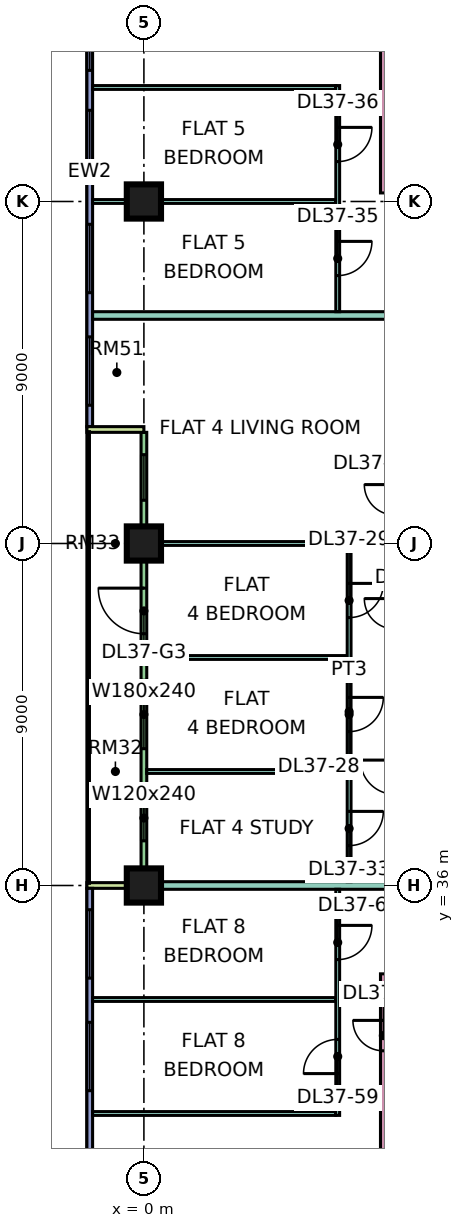
"""IFC4 building model, lengths in metres.
Left out: names, types, materials, properties, quantities, classifications, styles, units other than length and angle.
Written with IfcOpenShell. Run it as: python <this file> out.ifc"""

import sys

from ifc_helpers import new_model, si_unit, direction, frame, frame_2d, origin, origin_2d, place, context, subcontext, project, spatial, rectangle, extrude, element, fill, save


model = new_model("IFC4")
c1 = context("Model", 3, precision=1e-05, world=origin(), true_north=direction((0.0, 1.0)))
c2 = subcontext(c1, "Body", "Model", "MODEL_VIEW")
j1 = project(units=[si_unit("LENGTHUNIT", "METRE"), si_unit("PLANEANGLEUNIT", "RADIAN")], contexts=[c1])
p1 = place(None, origin())
s1 = spatial("IfcSite", under=j1, at=p1, CompositionType="ELEMENT")
p2 = place(p1, origin())
s2 = spatial("IfcBuilding", under=s1, at=p2, CompositionType="ELEMENT")
p3 = place(p2, frame((0.0, 0.0, 164.9)))
s3 = spatial("IfcBuildingStorey", under=s2, at=p3, CompositionType="ELEMENT", Elevation=164.9)
p4 = place(p3, frame((0.0, 36.0, 0.0), z_axis=(0.0, 0.0, 1.0), x_axis=(1.0, 0.0, 0.0)))
e1 = element("IfcColumn", 1, at=p4, inside=s3, PredefinedType="COLUMN", context=c2, shape_type="SweptSolid", body=[
    extrude(rectangle(XDim=0.9, YDim=0.9, at=origin_2d()), origin(), (0.0, 0.0, 1.0), 3.75),
])
for number, where, z_axis, x_axis in (
    (2, (0.0, 45.0, 0.0), (0.0, 0.0, 1.0), (1.0, 0.0, 0.0)),
    (3, (0.0, 54.0, 0.0), (0.0, 0.0, 1.0), (1.0, 0.0, 0.0)),
):
    element("IfcColumn", number, at=place(p3, frame(where, z_axis=z_axis, x_axis=x_axis)), inside=s3, PredefinedType="COLUMN", context=c2, shape_type="SweptSolid", body=[
        extrude(rectangle(XDim=0.9, YDim=0.9, at=origin_2d()), origin(), (0.0, 0.0, 1.0), 3.75),
    ])
p5 = place(p3, frame((-1.425, 61.5, 0.0), z_axis=(0.0, 0.0, 1.0), x_axis=(0.0, -1.0, 0.0)))
e4 = element("IfcWall", 4, at=p5, inside=s3, PredefinedType="SOLIDWALL", context=c2, shape_type="SweptSolid", body=[
    extrude(rectangle(XDim=13.425, YDim=0.15, at=frame_2d((6.712, 0.0))), origin(), (0.0, 0.0, 1.0), 3.35),
])
p6 = place(p5, frame((0.45, 0.0, 0.45)))
e5 = element("IfcOpeningElement", 5, at=p6, cuts=e4, PredefinedType="OPENING", context=c2, shape_type="SweptSolid", body=[
    extrude(rectangle(XDim=3.6, YDim=2.4, at=frame_2d((1.8, 1.2))), frame((0.0, 0.085, 0.0), z_axis=(0.0, -1.0, 0.0), x_axis=(1.0, 0.0, 0.0)), (0.0, 0.0, 1.0), 0.17),
])
p7 = place(p5, frame((5.1, 0.0, 0.45)))
e6 = element("IfcOpeningElement", 6, at=p7, cuts=e4, PredefinedType="OPENING", context=c2, shape_type="SweptSolid", body=[
    extrude(rectangle(XDim=1.8, YDim=2.4, at=frame_2d((0.9, 1.2))), frame((0.0, 0.085, 0.0), z_axis=(0.0, -1.0, 0.0), x_axis=(1.0, 0.0, 0.0)), (0.0, 0.0, 1.0), 0.17),
])
p8 = place(p5, frame((8.1, 0.0, 0.45)))
e7 = element("IfcOpeningElement", 7, at=p8, cuts=e4, PredefinedType="OPENING", context=c2, shape_type="SweptSolid", body=[
    extrude(rectangle(XDim=1.8, YDim=2.4, at=frame_2d((0.9, 1.2))), frame((0.0, 0.085, 0.0), z_axis=(0.0, -1.0, 0.0), x_axis=(1.0, 0.0, 0.0)), (0.0, 0.0, 1.0), 0.17),
])
p9 = place(p5, frame((11.062, 0.0, 0.45)))
e8 = element("IfcOpeningElement", 8, at=p9, cuts=e4, PredefinedType="OPENING", context=c2, shape_type="SweptSolid", body=[
    extrude(rectangle(XDim=1.8, YDim=2.4, at=frame_2d((0.9, 1.2))), frame((0.0, 0.085, 0.0), z_axis=(0.0, -1.0, 0.0), x_axis=(1.0, 0.0, 0.0)), (0.0, 0.0, 1.0), 0.17),
])
p10 = place(p3, frame((0.0, 47.925, 0.0), z_axis=(0.0, 0.0, 1.0), x_axis=(0.0, -1.0, 0.0)))
e9 = element("IfcWall", 9, at=p10, inside=s3, PredefinedType="SOLIDWALL", context=c2, shape_type="SweptSolid", body=[
    extrude(rectangle(XDim=11.85, YDim=0.15, at=frame_2d((5.925, 0.0))), origin(), (0.0, 0.0, 1.0), 3.35),
])
p11 = place(p10, frame((0.587, 0.0, 0.45)))
e10 = element("IfcOpeningElement", 10, at=p11, cuts=e9, PredefinedType="OPENING", context=c2, shape_type="SweptSolid", body=[
    extrude(rectangle(XDim=1.2, YDim=2.4, at=frame_2d((0.6, 1.2))), frame((0.0, 0.085, 0.0), z_axis=(0.0, -1.0, 0.0), x_axis=(1.0, 0.0, 0.0)), (0.0, 0.0, 1.0), 0.17),
])
p12 = place(p10, frame((4.1, 0.0, 0.0)))
e11 = element("IfcOpeningElement", 11, at=p12, cuts=e9, PredefinedType="OPENING", context=c2, shape_type="SweptSolid", body=[
    extrude(rectangle(XDim=1.2, YDim=2.4, at=frame_2d((0.6, 1.2))), frame((0.0, 0.085, 0.0), z_axis=(0.0, -1.0, 0.0), x_axis=(1.0, 0.0, 0.0)), (0.0, 0.0, 1.0), 0.17),
])
p13 = place(p10, frame((6.525, 0.0, 0.45)))
e12 = element("IfcOpeningElement", 12, at=p13, cuts=e9, PredefinedType="OPENING", context=c2, shape_type="SweptSolid", body=[
    extrude(rectangle(XDim=1.8, YDim=2.4, at=frame_2d((0.9, 1.2))), frame((0.0, 0.085, 0.0), z_axis=(0.0, -1.0, 0.0), x_axis=(1.0, 0.0, 0.0)), (0.0, 0.0, 1.0), 0.17),
])
p14 = place(p10, frame((9.55, 0.0, 0.45)))
e13 = element("IfcOpeningElement", 13, at=p14, cuts=e9, PredefinedType="OPENING", context=c2, shape_type="SweptSolid", body=[
    extrude(rectangle(XDim=1.2, YDim=2.4, at=frame_2d((0.6, 1.2))), frame((0.0, 0.085, 0.0), z_axis=(0.0, -1.0, 0.0), x_axis=(1.0, 0.0, 0.0)), (0.0, 0.0, 1.0), 0.17),
])
for number, where, z_axis, x_axis in (
    (14, (-1.5, 48.0, 0.0), (0.0, 0.0, 1.0), (1.0, 0.0, 0.0)),
    (15, (-1.5, 36.0, 0.0), (0.0, 0.0, 1.0), (1.0, 0.0, 0.0)),
):
    element("IfcWall", number, at=place(p3, frame(where, z_axis=z_axis, x_axis=x_axis)), inside=s3, PredefinedType="SOLIDWALL", context=c2, shape_type="SweptSolid", body=[
        extrude(rectangle(XDim=1.5, YDim=0.15, at=frame_2d((0.75, 0.0))), origin(), (0.0, 0.0, 1.0), 3.35),
    ])
p15 = place(p3, frame((-1.425, 35.925, 0.0), z_axis=(0.0, 0.0, 1.0), x_axis=(0.0, -1.0, 0.0)))
e16 = element("IfcWall", 16, at=p15, inside=s3, PredefinedType="SOLIDWALL", context=c2, shape_type="SweptSolid", body=[
    extrude(rectangle(XDim=11.85, YDim=0.15, at=frame_2d((5.925, 0.0))), origin(), (0.0, 0.0, 1.0), 3.35),
])
p16 = place(p15, frame((0.562, 0.0, 0.45)))
e17 = element("IfcOpeningElement", 17, at=p16, cuts=e16, PredefinedType="OPENING", context=c2, shape_type="SweptSolid", body=[
    extrude(rectangle(XDim=1.8, YDim=2.4, at=frame_2d((0.9, 1.2))), frame((0.0, 0.085, 0.0), z_axis=(0.0, -1.0, 0.0), x_axis=(1.0, 0.0, 0.0)), (0.0, 0.0, 1.0), 0.17),
])
p17 = place(p15, frame((3.525, 0.0, 0.45)))
e18 = element("IfcOpeningElement", 18, at=p17, cuts=e16, PredefinedType="OPENING", context=c2, shape_type="SweptSolid", body=[
    extrude(rectangle(XDim=1.8, YDim=2.4, at=frame_2d((0.9, 1.2))), frame((0.0, 0.085, 0.0), z_axis=(0.0, -1.0, 0.0), x_axis=(1.0, 0.0, 0.0)), (0.0, 0.0, 1.0), 0.17),
])
p18 = place(p15, frame((7.387, 0.0, 0.45)))
e19 = element("IfcOpeningElement", 19, at=p18, cuts=e16, PredefinedType="OPENING", context=c2, shape_type="SweptSolid", body=[
    extrude(rectangle(XDim=3.0, YDim=2.4, at=frame_2d((1.5, 1.2))), frame((0.0, 0.085, 0.0), z_axis=(0.0, -1.0, 0.0), x_axis=(1.0, 0.0, 0.0)), (0.0, 0.0, 1.0), 0.17),
])
for number, where, z_axis, x_axis in (
    (20, (-1.351, 33.0, 0.0), (0.0, 0.0, 1.0), (1.0, 0.0, 0.0)),
    (21, (-1.351, 54.0, 0.0), (0.0, 0.0, 1.0), (1.0, 0.0, 0.0)),
):
    element("IfcWall", number, at=place(p3, frame(where, z_axis=z_axis, x_axis=x_axis)), inside=s3, PredefinedType="PARTITIONING", context=c2, shape_type="SweptSolid", body=[
        extrude(rectangle(XDim=6.401, YDim=0.1, at=frame_2d((3.201, 0.0))), origin(), (0.0, 0.0, 1.0), 3.35),
    ])
p19 = place(p3, frame((-1.35, 30.0, 0.0), z_axis=(0.0, 0.0, 1.0), x_axis=(1.0, 0.0, 0.0)))
e22 = element("IfcWall", 22, at=p19, inside=s3, PredefinedType="PARTITIONING", context=c2, shape_type="SweptSolid", body=[
    extrude(rectangle(XDim=6.4, YDim=0.1, at=frame_2d((3.2, 0.0))), origin(), (0.0, 0.0, 1.0), 3.35),
])
e23 = element("IfcWall", 23, at=p4, inside=s3, PredefinedType="PARTITIONING", context=c2, shape_type="SweptSolid", body=[
    extrude(rectangle(XDim=9.5, YDim=0.2, at=frame_2d((4.75, 0.0))), origin(), (0.0, 0.0, 1.0), 3.35),
])
p20 = place(p3, frame((-1.35, 51.0, 0.0), z_axis=(0.0, 0.0, 1.0), x_axis=(1.0, 0.0, 0.0)))
e24 = element("IfcWall", 24, at=p20, inside=s3, PredefinedType="PARTITIONING", context=c2, shape_type="SweptSolid", body=[
    extrude(rectangle(XDim=10.85, YDim=0.2, at=frame_2d((5.425, 0.0))), origin(), (0.0, 0.0, 1.0), 3.35),
])
p21 = place(p3, frame((-1.35, 57.0, 0.0), z_axis=(0.0, 0.0, 1.0), x_axis=(1.0, 0.0, 0.0)))
e25 = element("IfcWall", 25, at=p21, inside=s3, PredefinedType="PARTITIONING", context=c2, shape_type="SweptSolid", body=[
    extrude(rectangle(XDim=6.4, YDim=0.1, at=frame_2d((3.2, 0.0))), origin(), (0.0, 0.0, 1.0), 3.35),
])
for number, where, z_axis, x_axis in (
    (26, (0.074, 39.0, 0.0), (0.0, 0.0, 1.0), (1.0, 0.0, 0.0)),
    (27, (0.074, 42.0, 0.0), (0.0, 0.0, 1.0), (1.0, 0.0, 0.0)),
    (28, (0.074, 45.0, 0.0), (0.0, 0.0, 1.0), (1.0, 0.0, 0.0)),
):
    element("IfcWall", number, at=place(p3, frame(where, z_axis=z_axis, x_axis=x_axis)), inside=s3, PredefinedType="PARTITIONING", context=c2, shape_type="SweptSolid", body=[
        extrude(rectangle(XDim=5.276, YDim=0.1, at=frame_2d((2.638, 0.0))), origin(), (0.0, 0.0, 1.0), 3.35),
    ])
p22 = place(p3, frame((5.1, 29.95, 0.0), z_axis=(0.0, 0.0, 1.0), x_axis=(0.0, 1.0, 0.0)))
e29 = element("IfcWall", 29, at=p22, inside=s3, PredefinedType="PARTITIONING", context=c2, shape_type="SweptSolid", body=[
    extrude(rectangle(XDim=5.95, YDim=0.1, at=frame_2d((2.975, 0.0))), origin(), (0.0, 0.0, 1.0), 3.35),
])
p23 = place(p22, frame((1.1, 0.0, 0.0)))
e30 = element("IfcOpeningElement", 30, at=p23, cuts=e29, PredefinedType="OPENING", context=c2, shape_type="SweptSolid", body=[
    extrude(rectangle(XDim=0.9, YDim=2.1, at=frame_2d((0.45, 1.05))), frame((0.0, 0.06, 0.0), z_axis=(0.0, -1.0, 0.0), x_axis=(1.0, 0.0, 0.0)), (0.0, 0.0, 1.0), 0.12),
])
p24 = place(p22, frame((4.1, 0.0, 0.0)))
e31 = element("IfcOpeningElement", 31, at=p24, cuts=e29, PredefinedType="OPENING", context=c2, shape_type="SweptSolid", body=[
    extrude(rectangle(XDim=0.9, YDim=2.1, at=frame_2d((0.45, 1.05))), frame((0.0, 0.06, 0.0), z_axis=(0.0, -1.0, 0.0), x_axis=(1.0, 0.0, 0.0)), (0.0, 0.0, 1.0), 0.12),
])
p25 = place(p3, frame((5.1, 51.1, 0.0), z_axis=(0.0, 0.0, 1.0), x_axis=(0.0, 1.0, 0.0)))
e32 = element("IfcWall", 32, at=p25, inside=s3, PredefinedType="PARTITIONING", context=c2, shape_type="SweptSolid", body=[
    extrude(rectangle(XDim=5.95, YDim=0.1, at=frame_2d((2.975, 0.0))), origin(), (0.0, 0.0, 1.0), 3.35),
])
p26 = place(p25, frame((0.95, 0.0, 0.0)))
e33 = element("IfcOpeningElement", 33, at=p26, cuts=e32, PredefinedType="OPENING", context=c2, shape_type="SweptSolid", body=[
    extrude(rectangle(XDim=0.9, YDim=2.1, at=frame_2d((0.45, 1.05))), frame((0.0, 0.06, 0.0), z_axis=(0.0, -1.0, 0.0), x_axis=(1.0, 0.0, 0.0)), (0.0, 0.0, 1.0), 0.12),
])
p27 = place(p25, frame((3.95, 0.0, 0.0)))
e34 = element("IfcOpeningElement", 34, at=p27, cuts=e32, PredefinedType="OPENING", context=c2, shape_type="SweptSolid", body=[
    extrude(rectangle(XDim=0.9, YDim=2.1, at=frame_2d((0.45, 1.05))), frame((0.0, 0.06, 0.0), z_axis=(0.0, -1.0, 0.0), x_axis=(1.0, 0.0, 0.0)), (0.0, 0.0, 1.0), 0.12),
])
p28 = place(p3, frame((5.4, 36.1, 0.0), z_axis=(0.0, 0.0, 1.0), x_axis=(0.0, 1.0, 0.0)))
e35 = element("IfcWall", 35, at=p28, inside=s3, PredefinedType="PARTITIONING", context=c2, shape_type="SweptSolid", body=[
    extrude(rectangle(XDim=8.95, YDim=0.1, at=frame_2d((4.475, 0.0))), origin(), (0.0, 0.0, 1.0), 3.35),
])
p29 = place(p28, frame((3.95, 0.0, 0.0)))
e36 = element("IfcOpeningElement", 36, at=p29, cuts=e35, PredefinedType="OPENING", context=c2, shape_type="SweptSolid", body=[
    extrude(rectangle(XDim=0.9, YDim=2.1, at=frame_2d((0.45, 1.05))), frame((0.0, 0.06, 0.0), z_axis=(0.0, -1.0, 0.0), x_axis=(1.0, 0.0, 0.0)), (0.0, 0.0, 1.0), 0.12),
])
p30 = place(p28, frame((6.95, 0.0, 0.0)))
e37 = element("IfcOpeningElement", 37, at=p30, cuts=e35, PredefinedType="OPENING", context=c2, shape_type="SweptSolid", body=[
    extrude(rectangle(XDim=0.9, YDim=2.1, at=frame_2d((0.45, 1.05))), frame((0.0, 0.06, 0.0), z_axis=(0.0, -1.0, 0.0), x_axis=(1.0, 0.0, 0.0)), (0.0, 0.0, 1.0), 0.12),
])
p31 = place(p28, frame((0.95, 0.0, 0.0)))
e38 = element("IfcOpeningElement", 38, at=p31, cuts=e35, PredefinedType="OPENING", context=c2, shape_type="SweptSolid", body=[
    extrude(rectangle(XDim=0.9, YDim=2.1, at=frame_2d((0.45, 1.05))), frame((0.0, 0.06, 0.0), z_axis=(0.0, -1.0, 0.0), x_axis=(1.0, 0.0, 0.0)), (0.0, 0.0, 1.0), 0.12),
])
p32 = place(p3, frame((6.3, 22.5, 0.0), z_axis=(0.0, 0.0, 1.0), x_axis=(0.0, 1.0, 0.0)))
e39 = element("IfcWall", 39, at=p32, inside=s3, PredefinedType="PARTITIONING", context=c2, shape_type="SweptSolid", body=[
    extrude(rectangle(XDim=11.175, YDim=0.15, at=frame_2d((5.587, 0.0))), origin(), (0.0, 0.0, 1.0), 3.35),
])
p33 = place(p32, frame((9.15, 0.0, 0.0)))
e40 = element("IfcOpeningElement", 40, at=p33, cuts=e39, PredefinedType="OPENING", context=c2, shape_type="SweptSolid", body=[
    extrude(rectangle(XDim=0.8, YDim=2.1, at=frame_2d((0.4, 1.05))), frame((0.0, 0.085, 0.0), z_axis=(0.0, -1.0, 0.0), x_axis=(1.0, 0.0, 0.0)), (0.0, 0.0, 1.0), 0.17),
])
p34 = place(p32, frame((3.5, 0.0, 0.0)))
e41 = element("IfcOpeningElement", 41, at=p34, cuts=e39, PredefinedType="OPENING", context=c2, shape_type="SweptSolid", body=[
    extrude(rectangle(XDim=0.9, YDim=2.1, at=frame_2d((0.45, 1.05))), frame((0.0, 0.085, 0.0), z_axis=(0.0, -1.0, 0.0), x_axis=(1.0, 0.0, 0.0)), (0.0, 0.0, 1.0), 0.17),
])
p35 = place(p3, frame((6.3, 54.225, 0.0), z_axis=(0.0, 0.0, 1.0), x_axis=(0.0, 1.0, 0.0)))
e42 = element("IfcWall", 42, at=p35, inside=s3, PredefinedType="PARTITIONING", context=c2, shape_type="SweptSolid", body=[
    extrude(rectangle(XDim=10.125, YDim=0.15, at=frame_2d((5.062, 0.0))), origin(), (0.0, 0.0, 1.0), 3.35),
])
p36 = place(p35, frame((5.325, 0.0, 0.0)))
e43 = element("IfcOpeningElement", 43, at=p36, cuts=e42, PredefinedType="OPENING", context=c2, shape_type="SweptSolid", body=[
    extrude(rectangle(XDim=0.9, YDim=2.1, at=frame_2d((0.45, 1.05))), frame((0.0, 0.085, 0.0), z_axis=(0.0, -1.0, 0.0), x_axis=(1.0, 0.0, 0.0)), (0.0, 0.0, 1.0), 0.17),
])
p37 = place(p6, origin())
e44 = element("IfcWindow", 44, at=p37, inside=s3, PartitioningType="SINGLE_PANEL", PredefinedType="WINDOW", context=c2, shape_type="SweptSolid", body=[
    extrude(rectangle(XDim=3.6, YDim=2.4, at=frame_2d((1.8, 1.2))), frame((0.0, 0.03, 0.0), z_axis=(0.0, -1.0, 0.0), x_axis=(1.0, 0.0, 0.0)), (0.0, 0.0, 1.0), 0.06),
])
fill(e5, e44)
p38 = place(p7, origin())
e45 = element("IfcWindow", 45, at=p38, inside=s3, PartitioningType="SINGLE_PANEL", PredefinedType="WINDOW", context=c2, shape_type="SweptSolid", body=[
    extrude(rectangle(XDim=1.8, YDim=2.4, at=frame_2d((0.9, 1.2))), frame((0.0, 0.03, 0.0), z_axis=(0.0, -1.0, 0.0), x_axis=(1.0, 0.0, 0.0)), (0.0, 0.0, 1.0), 0.06),
])
fill(e6, e45)
p39 = place(p8, origin())
e46 = element("IfcWindow", 46, at=p39, inside=s3, PartitioningType="SINGLE_PANEL", PredefinedType="WINDOW", context=c2, shape_type="SweptSolid", body=[
    extrude(rectangle(XDim=1.8, YDim=2.4, at=frame_2d((0.9, 1.2))), frame((0.0, 0.03, 0.0), z_axis=(0.0, -1.0, 0.0), x_axis=(1.0, 0.0, 0.0)), (0.0, 0.0, 1.0), 0.06),
])
fill(e7, e46)
p40 = place(p9, origin())
e47 = element("IfcWindow", 47, at=p40, inside=s3, PartitioningType="SINGLE_PANEL", PredefinedType="WINDOW", context=c2, shape_type="SweptSolid", body=[
    extrude(rectangle(XDim=1.8, YDim=2.4, at=frame_2d((0.9, 1.2))), frame((0.0, 0.03, 0.0), z_axis=(0.0, -1.0, 0.0), x_axis=(1.0, 0.0, 0.0)), (0.0, 0.0, 1.0), 0.06),
])
fill(e8, e47)
p41 = place(p11, origin())
e48 = element("IfcWindow", 48, at=p41, inside=s3, PartitioningType="SINGLE_PANEL", PredefinedType="WINDOW", context=c2, shape_type="SweptSolid", body=[
    extrude(rectangle(XDim=1.2, YDim=2.4, at=frame_2d((0.6, 1.2))), frame((0.0, 0.03, 0.0), z_axis=(0.0, -1.0, 0.0), x_axis=(1.0, 0.0, 0.0)), (0.0, 0.0, 1.0), 0.06),
])
fill(e10, e48)
p42 = place(p12, frame((1.2, 0.0, 0.0), z_axis=(0.0, 0.0, 1.0), x_axis=(-1.0, 0.0, 0.0)))
e49 = element("IfcDoor", 49, at=p42, inside=s3, OperationType="DOUBLE_DOOR_SINGLE_SWING", PredefinedType="DOOR", context=c2, shape_type="SweptSolid", body=[
    extrude(rectangle(XDim=1.2, YDim=2.4, at=frame_2d((0.6, 1.2))), frame((0.0, 0.025, 0.0), z_axis=(0.0, -1.0, 0.0), x_axis=(1.0, 0.0, 0.0)), (0.0, 0.0, 1.0), 0.05),
])
fill(e11, e49)
p43 = place(p13, origin())
e50 = element("IfcWindow", 50, at=p43, inside=s3, PartitioningType="SINGLE_PANEL", PredefinedType="WINDOW", context=c2, shape_type="SweptSolid", body=[
    extrude(rectangle(XDim=1.8, YDim=2.4, at=frame_2d((0.9, 1.2))), frame((0.0, 0.03, 0.0), z_axis=(0.0, -1.0, 0.0), x_axis=(1.0, 0.0, 0.0)), (0.0, 0.0, 1.0), 0.06),
])
fill(e12, e50)
p44 = place(p14, origin())
e51 = element("IfcWindow", 51, at=p44, inside=s3, PartitioningType="SINGLE_PANEL", PredefinedType="WINDOW", context=c2, shape_type="SweptSolid", body=[
    extrude(rectangle(XDim=1.2, YDim=2.4, at=frame_2d((0.6, 1.2))), frame((0.0, 0.03, 0.0), z_axis=(0.0, -1.0, 0.0), x_axis=(1.0, 0.0, 0.0)), (0.0, 0.0, 1.0), 0.06),
])
fill(e13, e51)
p45 = place(p16, origin())
e52 = element("IfcWindow", 52, at=p45, inside=s3, PartitioningType="SINGLE_PANEL", PredefinedType="WINDOW", context=c2, shape_type="SweptSolid", body=[
    extrude(rectangle(XDim=1.8, YDim=2.4, at=frame_2d((0.9, 1.2))), frame((0.0, 0.03, 0.0), z_axis=(0.0, -1.0, 0.0), x_axis=(1.0, 0.0, 0.0)), (0.0, 0.0, 1.0), 0.06),
])
fill(e17, e52)
p46 = place(p17, origin())
e53 = element("IfcWindow", 53, at=p46, inside=s3, PartitioningType="SINGLE_PANEL", PredefinedType="WINDOW", context=c2, shape_type="SweptSolid", body=[
    extrude(rectangle(XDim=1.8, YDim=2.4, at=frame_2d((0.9, 1.2))), frame((0.0, 0.03, 0.0), z_axis=(0.0, -1.0, 0.0), x_axis=(1.0, 0.0, 0.0)), (0.0, 0.0, 1.0), 0.06),
])
fill(e18, e53)
p47 = place(p29, origin())
e54 = element("IfcDoor", 54, at=p47, inside=s3, OperationType="SINGLE_SWING_RIGHT", PredefinedType="DOOR", context=c2, shape_type="SweptSolid", body=[
    extrude(rectangle(XDim=0.9, YDim=2.1, at=frame_2d((0.45, 1.05))), frame((0.0, 0.025, 0.0), z_axis=(0.0, -1.0, 0.0), x_axis=(1.0, 0.0, 0.0)), (0.0, 0.0, 1.0), 0.05),
])
fill(e36, e54)
p48 = place(p30, origin())
e55 = element("IfcDoor", 55, at=p48, inside=s3, OperationType="SINGLE_SWING_RIGHT", PredefinedType="DOOR", context=c2, shape_type="SweptSolid", body=[
    extrude(rectangle(XDim=0.9, YDim=2.1, at=frame_2d((0.45, 1.05))), frame((0.0, 0.025, 0.0), z_axis=(0.0, -1.0, 0.0), x_axis=(1.0, 0.0, 0.0)), (0.0, 0.0, 1.0), 0.05),
])
fill(e37, e55)
p49 = place(p31, origin())
e56 = element("IfcDoor", 56, at=p49, inside=s3, OperationType="SINGLE_SWING_RIGHT", PredefinedType="DOOR", context=c2, shape_type="SweptSolid", body=[
    extrude(rectangle(XDim=0.9, YDim=2.1, at=frame_2d((0.45, 1.05))), frame((0.0, 0.025, 0.0), z_axis=(0.0, -1.0, 0.0), x_axis=(1.0, 0.0, 0.0)), (0.0, 0.0, 1.0), 0.05),
])
fill(e38, e56)
p50 = place(p26, origin())
e57 = element("IfcDoor", 57, at=p50, inside=s3, OperationType="SINGLE_SWING_RIGHT", PredefinedType="DOOR", context=c2, shape_type="SweptSolid", body=[
    extrude(rectangle(XDim=0.9, YDim=2.1, at=frame_2d((0.45, 1.05))), frame((0.0, 0.025, 0.0), z_axis=(0.0, -1.0, 0.0), x_axis=(1.0, 0.0, 0.0)), (0.0, 0.0, 1.0), 0.05),
])
fill(e33, e57)
p51 = place(p27, origin())
e58 = element("IfcDoor", 58, at=p51, inside=s3, OperationType="SINGLE_SWING_RIGHT", PredefinedType="DOOR", context=c2, shape_type="SweptSolid", body=[
    extrude(rectangle(XDim=0.9, YDim=2.1, at=frame_2d((0.45, 1.05))), frame((0.0, 0.025, 0.0), z_axis=(0.0, -1.0, 0.0), x_axis=(1.0, 0.0, 0.0)), (0.0, 0.0, 1.0), 0.05),
])
fill(e34, e58)
p52 = place(p33, frame((0.8, 0.0, 0.0), z_axis=(0.0, 0.0, 1.0), x_axis=(-1.0, 0.0, 0.0)))
e59 = element("IfcDoor", 59, at=p52, inside=s3, OperationType="SINGLE_SWING_RIGHT", PredefinedType="DOOR", context=c2, shape_type="SweptSolid", body=[
    extrude(rectangle(XDim=0.8, YDim=2.1, at=frame_2d((0.4, 1.05))), frame((0.0, 0.025, 0.0), z_axis=(0.0, -1.0, 0.0), x_axis=(1.0, 0.0, 0.0)), (0.0, 0.0, 1.0), 0.05),
])
fill(e40, e59)
p53 = place(p23, origin())
e60 = element("IfcDoor", 60, at=p53, inside=s3, OperationType="SINGLE_SWING_LEFT", PredefinedType="DOOR", context=c2, shape_type="SweptSolid", body=[
    extrude(rectangle(XDim=0.9, YDim=2.1, at=frame_2d((0.45, 1.05))), frame((0.0, 0.025, 0.0), z_axis=(0.0, -1.0, 0.0), x_axis=(1.0, 0.0, 0.0)), (0.0, 0.0, 1.0), 0.05),
])
fill(e30, e60)
p54 = place(p24, origin())
e61 = element("IfcDoor", 61, at=p54, inside=s3, OperationType="SINGLE_SWING_RIGHT", PredefinedType="DOOR", context=c2, shape_type="SweptSolid", body=[
    extrude(rectangle(XDim=0.9, YDim=2.1, at=frame_2d((0.45, 1.05))), frame((0.0, 0.025, 0.0), z_axis=(0.0, -1.0, 0.0), x_axis=(1.0, 0.0, 0.0)), (0.0, 0.0, 1.0), 0.05),
])
fill(e31, e61)
save(model, sys.argv[1])
